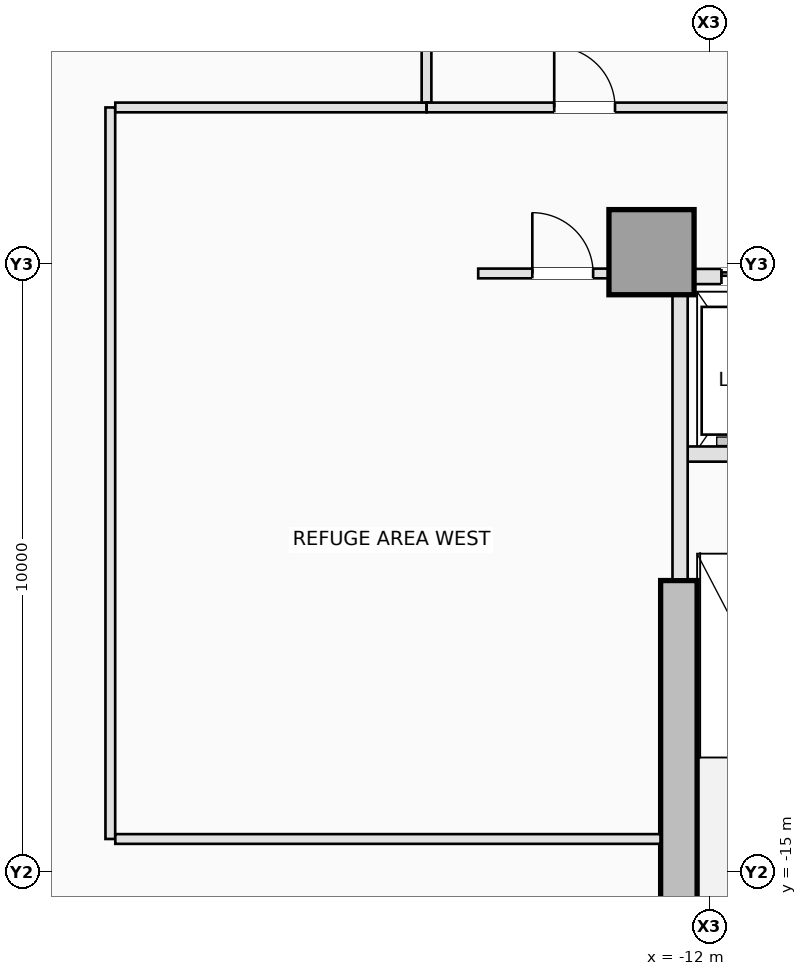
"""IFC4 building model, lengths in metres.
Left out: names, types, materials, properties, quantities, classifications, styles, units other than length and angle.
Written with IfcOpenShell. Run it as: python <this file> out.ifc"""

import sys

from ifc_helpers import new_model, si_unit, direction, frame, frame_2d, origin, origin_2d, place, context, subcontext, project, spatial, rectangle, extrude, element, fill, save


model = new_model("IFC4")
c1 = context("Model", 3, precision=1e-05, world=origin(), true_north=direction((0.0, 1.0)))
c2 = subcontext(c1, "Body", "Model", "MODEL_VIEW")
j1 = project(units=[si_unit("LENGTHUNIT", "METRE"), si_unit("PLANEANGLEUNIT", "RADIAN")], contexts=[c1])
p1 = place(None, origin())
s1 = spatial("IfcSite", under=j1, at=p1, CompositionType="ELEMENT")
p2 = place(p1, origin())
s2 = spatial("IfcBuilding", under=s1, at=p2, CompositionType="ELEMENT")
p3 = place(p2, frame((0.0, 0.0, 23.0)))
s3 = spatial("IfcBuildingStorey", under=s2, at=p3, CompositionType="ELEMENT", Elevation=23.0)
p4 = place(p3, frame((-12.5, -15.8, 0.0), z_axis=(0.0, 0.0, 1.0), x_axis=(0.0, 1.0, 0.0)))
e1 = element("IfcWall", 1, at=p4, inside=s3, PredefinedType="SHEAR", context=c2, shape_type="SweptSolid", body=[
    extrude(rectangle(XDim=5.6, YDim=0.6, at=frame_2d((2.8, 0.0))), origin(), (0.0, 0.0, 1.0), 4.6),
])
p5 = place(p3, frame((-12.95, -4.8, 0.0), z_axis=(0.0, 0.0, 1.0), x_axis=(1.0, 0.0, 0.0)))
e2 = element("IfcColumn", 2, at=p5, inside=s3, PredefinedType="COLUMN", context=c2, shape_type="SweptSolid", body=[
    extrude(rectangle(XDim=1.4, YDim=1.4, at=origin_2d()), origin(), (0.0, 0.0, 1.0), 4.6),
])
p6 = place(p3, frame((-12.38, -8.12, 0.0), z_axis=(0.0, 0.0, 1.0), x_axis=(1.0, 0.0, 0.0)))
e3 = element("IfcWall", 3, at=p6, inside=s3, PredefinedType="PARTITIONING", context=c2, shape_type="SweptSolid", body=[
    extrude(rectangle(XDim=3.22, YDim=0.25, at=frame_2d((1.61, 0.0))), origin(), (0.0, 0.0, 1.0), 4.35),
])
p7 = place(p3, frame((-12.48, -10.18, 0.0), z_axis=(0.0, 0.0, 1.0), x_axis=(0.0, 1.0, 0.0)))
e4 = element("IfcWall", 4, at=p7, inside=s3, PredefinedType="PARTITIONING", context=c2, shape_type="SweptSolid", body=[
    extrude(rectangle(XDim=4.678, YDim=0.25, at=frame_2d((2.339, 0.0))), origin(), (0.0, 0.0, 1.0), 4.35),
])
p8 = place(p3, frame((-12.248, -5.2, 0.0), z_axis=(0.0, 0.0, 1.0), x_axis=(1.0, 0.0, 0.0)))
e5 = element("IfcWall", 5, at=p8, inside=s3, PredefinedType="PARTITIONING", context=c2, shape_type="SweptSolid", body=[
    extrude(rectangle(XDim=7.796, YDim=0.25, at=frame_2d((3.898, 0.0))), origin(), (0.0, 0.0, 1.0), 2.55),
])
p9 = place(p8, frame((0.448, 0.0, 0.0)))
e6 = element("IfcOpeningElement", 6, at=p9, cuts=e5, PredefinedType="OPENING", context=c2, shape_type="SweptSolid", body=[
    extrude(rectangle(XDim=1.0, YDim=2.15, at=frame_2d((0.5, 1.075))), frame((0.0, 0.135, 0.0), z_axis=(0.0, -1.0, 0.0), x_axis=(1.0, 0.0, 0.0)), (0.0, 0.0, 1.0), 0.27),
])
p10 = place(p8, frame((2.398, 0.0, 0.0)))
e7 = element("IfcOpeningElement", 7, at=p10, cuts=e5, PredefinedType="OPENING", context=c2, shape_type="SweptSolid", body=[
    extrude(rectangle(XDim=1.0, YDim=2.15, at=frame_2d((0.5, 1.075))), frame((0.0, 0.135, 0.0), z_axis=(0.0, -1.0, 0.0), x_axis=(1.0, 0.0, 0.0)), (0.0, 0.0, 1.0), 0.27),
])
p11 = place(p8, frame((4.348, 0.0, 0.0)))
e8 = element("IfcOpeningElement", 8, at=p11, cuts=e5, PredefinedType="OPENING", context=c2, shape_type="SweptSolid", body=[
    extrude(rectangle(XDim=1.0, YDim=2.15, at=frame_2d((0.5, 1.075))), frame((0.0, 0.135, 0.0), z_axis=(0.0, -1.0, 0.0), x_axis=(1.0, 0.0, 0.0)), (0.0, 0.0, 1.0), 0.27),
])
p12 = place(p8, frame((6.298, 0.0, 0.0)))
e9 = element("IfcOpeningElement", 9, at=p12, cuts=e5, PredefinedType="OPENING", context=c2, shape_type="SweptSolid", body=[
    extrude(rectangle(XDim=1.0, YDim=2.15, at=frame_2d((0.5, 1.075))), frame((0.0, 0.135, 0.0), z_axis=(0.0, -1.0, 0.0), x_axis=(1.0, 0.0, 0.0)), (0.0, 0.0, 1.0), 0.27),
])
p13 = place(p3, frame((-21.85, -14.45, 0.0), z_axis=(0.0, 0.0, 1.0), x_axis=(0.0, 1.0, 0.0)))
e10 = element("IfcWall", 10, at=p13, inside=s3, PredefinedType="PARTITIONING", context=c2, shape_type="SweptSolid", body=[
    extrude(rectangle(XDim=12.03, YDim=0.16, at=frame_2d((6.015, 0.0))), origin(), (0.0, 0.0, 1.0), 4.35),
])
p14 = place(p3, frame((-21.768, -14.45, 0.0), z_axis=(0.0, 0.0, 1.0), x_axis=(1.0, 0.0, 0.0)))
e11 = element("IfcWall", 11, at=p14, inside=s3, PredefinedType="PARTITIONING", context=c2, shape_type="SweptSolid", body=[
    extrude(rectangle(XDim=8.966, YDim=0.16, at=frame_2d((4.483, 0.0))), origin(), (0.0, 0.0, 1.0), 4.35),
])
p15 = place(p3, frame((-21.768, -2.42, 0.0), z_axis=(0.0, 0.0, 1.0), x_axis=(1.0, 0.0, 0.0)))
e12 = element("IfcWall", 12, at=p15, inside=s3, PredefinedType="PARTITIONING", context=c2, shape_type="SweptSolid", body=[
    extrude(rectangle(XDim=5.118, YDim=0.16, at=frame_2d((2.559, 0.0))), origin(), (0.0, 0.0, 1.0), 4.35),
])
p16 = place(p3, frame((-16.65, -2.338, 0.0), z_axis=(0.0, 0.0, 1.0), x_axis=(0.0, 1.0, 0.0)))
e13 = element("IfcWall", 13, at=p16, inside=s3, PredefinedType="PARTITIONING", context=c2, shape_type="SweptSolid", body=[
    extrude(rectangle(XDim=7.008, YDim=0.16, at=frame_2d((3.504, 0.0))), origin(), (0.0, 0.0, 1.0), 4.35),
])
p17 = place(p3, frame((-16.648, -2.42, 0.0), z_axis=(0.0, 0.0, 1.0), x_axis=(1.0, 0.0, 0.0)))
e14 = element("IfcWall", 14, at=p17, inside=s3, PredefinedType="PARTITIONING", context=c2, shape_type="SweptSolid", body=[
    extrude(rectangle(XDim=5.246, YDim=0.16, at=frame_2d((2.623, 0.0))), origin(), (0.0, 0.0, 1.0), 4.35),
])
p18 = place(p17, frame((2.098, 0.0, 0.0)))
e15 = element("IfcOpeningElement", 15, at=p18, cuts=e14, PredefinedType="OPENING", context=c2, shape_type="SweptSolid", body=[
    extrude(rectangle(XDim=1.0, YDim=2.15, at=frame_2d((0.5, 1.075))), frame((0.0, 0.09, 0.0), z_axis=(0.0, -1.0, 0.0), x_axis=(1.0, 0.0, 0.0)), (0.0, 0.0, 1.0), 0.18),
])
p19 = place(p3, frame((-15.8, -5.15, 0.0), z_axis=(0.0, 0.0, 1.0), x_axis=(1.0, 0.0, 0.0)))
e16 = element("IfcWall", 16, at=p19, inside=s3, PredefinedType="PARTITIONING", context=c2, shape_type="SweptSolid", body=[
    extrude(rectangle(XDim=2.148, YDim=0.16, at=frame_2d((1.074, 0.0))), origin(), (0.0, 0.0, 1.0), 2.55),
])
p20 = place(p19, frame((0.89, 0.0, 0.0)))
e17 = element("IfcOpeningElement", 17, at=p20, cuts=e16, PredefinedType="OPENING", context=c2, shape_type="SweptSolid", body=[
    extrude(rectangle(XDim=1.0, YDim=2.15, at=frame_2d((0.5, 1.075))), frame((0.0, 0.09, 0.0), z_axis=(0.0, -1.0, 0.0), x_axis=(1.0, 0.0, 0.0)), (0.0, 0.0, 1.0), 0.18),
])
p21 = place(p9, origin())
e18 = element("IfcDoor", 18, at=p21, inside=s3, OperationType="SLIDING_TO_LEFT", PredefinedType="DOOR", context=c2, shape_type="SweptSolid", body=[
    extrude(rectangle(XDim=1.0, YDim=2.15, at=frame_2d((0.5, 1.075))), frame((0.0, 0.025, 0.0), z_axis=(0.0, -1.0, 0.0), x_axis=(1.0, 0.0, 0.0)), (0.0, 0.0, 1.0), 0.05),
])
fill(e6, e18)
p22 = place(p18, origin())
e19 = element("IfcDoor", 19, at=p22, inside=s3, OperationType="SINGLE_SWING_LEFT", PredefinedType="DOOR", context=c2, shape_type="SweptSolid", body=[
    extrude(rectangle(XDim=1.0, YDim=2.15, at=frame_2d((0.5, 1.075))), frame((0.0, 0.025, 0.0), z_axis=(0.0, -1.0, 0.0), x_axis=(1.0, 0.0, 0.0)), (0.0, 0.0, 1.0), 0.05),
])
fill(e15, e19)
p23 = place(p20, origin())
e20 = element("IfcDoor", 20, at=p23, inside=s3, OperationType="SINGLE_SWING_LEFT", PredefinedType="DOOR", context=c2, shape_type="SweptSolid", body=[
    extrude(rectangle(XDim=1.0, YDim=2.15, at=frame_2d((0.5, 1.075))), frame((0.0, 0.025, 0.0), z_axis=(0.0, -1.0, 0.0), x_axis=(1.0, 0.0, 0.0)), (0.0, 0.0, 1.0), 0.05),
])
fill(e17, e20)
save(model, sys.argv[1])
